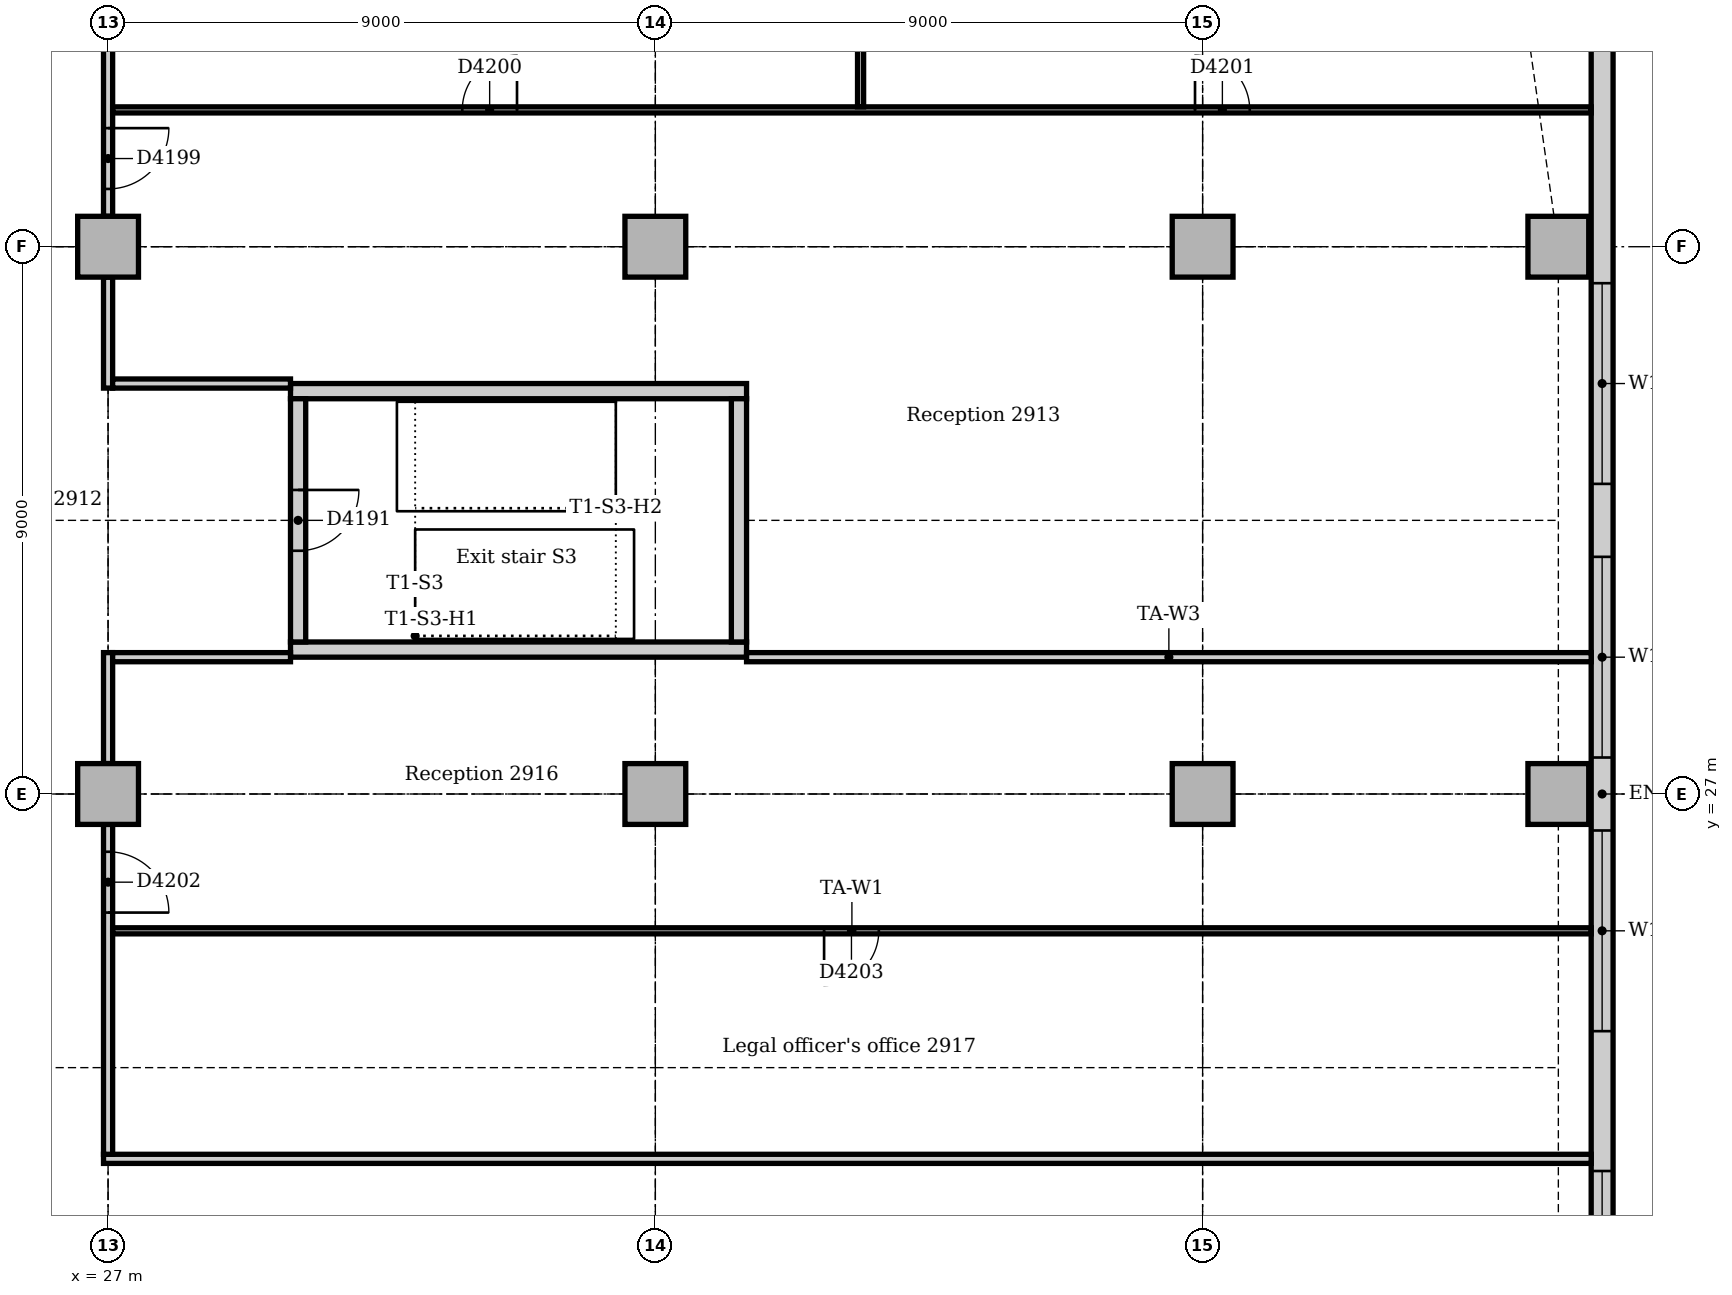
"""IFC4 building model, lengths in metres.
Left out: names, types, materials, properties, quantities, classifications, styles, units other than length and angle.
Written with IfcOpenShell. Run it as: python <this file> out.ifc"""

import sys

from ifc_helpers import new_model, si_unit, direction, frame, frame_2d, origin, origin_2d, place, context, subcontext, project, spatial, rectangle, extrude, element, fill, save


model = new_model("IFC4")
c1 = context("Model", 3, precision=1e-05, world=origin(), true_north=direction((0.0, 1.0)))
c2 = subcontext(c1, "Body", "Model", "MODEL_VIEW")
j1 = project(units=[si_unit("LENGTHUNIT", "METRE"), si_unit("PLANEANGLEUNIT", "RADIAN")], contexts=[c1])
p1 = place(None, origin())
s1 = spatial("IfcSite", under=j1, at=p1, CompositionType="ELEMENT")
p2 = place(p1, origin())
s2 = spatial("IfcBuilding", under=s1, at=p2, CompositionType="ELEMENT")
p3 = place(p2, frame((0.0, 0.0, 124.0)))
s3 = spatial("IfcBuildingStorey", under=s2, at=p3, CompositionType="ELEMENT", Elevation=124.0)
for number, where, z_axis, x_axis in (
    (1, (30.0, 29.375, 0.0), (0.0, 0.0, 1.0), (1.0, 0.0, 0.0)),
    (2, (37.5, 33.625, 0.0), (0.0, 0.0, 1.0), (-1.0, 0.0, 0.0)),
):
    element("IfcWall", number, at=place(p3, frame(where, z_axis=z_axis, x_axis=x_axis)), inside=s3, PredefinedType="SOLIDWALL", context=c2, shape_type="SweptSolid", body=[
        extrude(rectangle(XDim=7.5, YDim=0.25, at=frame_2d((3.75, 0.0))), origin(), (0.0, 0.0, 1.0), 4.0),
    ])
p4 = place(p3, frame((37.375, 29.5, 0.0), z_axis=(0.0, 0.0, 1.0), x_axis=(0.0, 1.0, 0.0)))
e3 = element("IfcWall", 3, at=p4, inside=s3, PredefinedType="SOLIDWALL", context=c2, shape_type="SweptSolid", body=[
    extrude(rectangle(XDim=4.0, YDim=0.25, at=frame_2d((2.0, 0.0))), origin(), (0.0, 0.0, 1.0), 4.0),
])
p5 = place(p3, frame((30.125, 33.5, 0.0), z_axis=(0.0, 0.0, 1.0), x_axis=(0.0, -1.0, 0.0)))
e4 = element("IfcWall", 4, at=p5, inside=s3, PredefinedType="SOLIDWALL", context=c2, shape_type="SweptSolid", body=[
    extrude(rectangle(XDim=4.0, YDim=0.25, at=frame_2d((2.0, 0.0))), origin(), (0.0, 0.0, 1.0), 4.0),
])
p6 = place(p5, frame((1.5, 0.0, 0.0)))
e5 = element("IfcOpeningElement", 5, at=p6, cuts=e4, PredefinedType="OPENING", context=c2, shape_type="SweptSolid", body=[
    extrude(rectangle(XDim=1.0, YDim=2.1, at=frame_2d((0.5, 1.05))), frame((0.0, 0.135, 0.0), z_axis=(0.0, -1.0, 0.0), x_axis=(1.0, 0.0, 0.0)), (0.0, 0.0, 1.0), 0.27),
])
for number, where, z_axis, x_axis in (
    (6, (50.85, 27.0, 0.0), (0.0, 0.0, 1.0), (1.0, 0.0, 0.0)),
    (7, (50.85, 36.0, 0.0), (0.0, 0.0, 1.0), (1.0, 0.0, 0.0)),
    (8, (27.0, 27.0, 0.0), (0.0, 0.0, 1.0), (1.0, 0.0, 0.0)),
    (9, (27.0, 36.0, 0.0), (0.0, 0.0, 1.0), (1.0, 0.0, 0.0)),
    (10, (36.0, 27.0, 0.0), (0.0, 0.0, 1.0), (1.0, 0.0, 0.0)),
    (11, (36.0, 36.0, 0.0), (0.0, 0.0, 1.0), (1.0, 0.0, 0.0)),
    (12, (45.0, 27.0, 0.0), (0.0, 0.0, 1.0), (1.0, 0.0, 0.0)),
    (13, (45.0, 36.0, 0.0), (0.0, 0.0, 1.0), (1.0, 0.0, 0.0)),
):
    element("IfcColumn", number, at=place(p3, frame(where, z_axis=z_axis, x_axis=x_axis)), inside=s3, PredefinedType="COLUMN", context=c2, shape_type="SweptSolid", body=[
        extrude(rectangle(XDim=1.0, YDim=1.0, at=origin_2d()), origin(), (0.0, 0.0, 1.0), 3.85),
    ])
p7 = place(p3, frame((51.57, 14.743, 0.0), z_axis=(0.0, 0.0, 1.0), x_axis=(0.0, 1.0, 0.0)))
e14 = element("IfcWall", 14, at=p7, inside=s3, PredefinedType="STANDARD", context=c2, shape_type="SweptSolid", body=[
    extrude(rectangle(XDim=24.515, YDim=0.36, at=frame_2d((12.257, 0.0))), origin(), (0.0, 0.0, 1.0), 3.85),
])
p8 = place(p7, frame((4.257, 0.0, 0.9)))
e15 = element("IfcOpeningElement", 15, at=p8, cuts=e14, PredefinedType="OPENING", context=c2, shape_type="SweptSolid", body=[
    extrude(rectangle(XDim=1.8, YDim=1.6, at=frame_2d((0.9, 0.8))), frame((0.0, 0.19, 0.0), z_axis=(0.0, -1.0, 0.0), x_axis=(1.0, 0.0, 0.0)), (0.0, 0.0, 1.0), 0.38),
])
p9 = place(p7, frame((8.357, 0.0, 0.9)))
e16 = element("IfcOpeningElement", 16, at=p9, cuts=e14, PredefinedType="OPENING", context=c2, shape_type="SweptSolid", body=[
    extrude(rectangle(XDim=3.3, YDim=1.6, at=frame_2d((1.65, 0.8))), frame((0.0, 0.19, 0.0), z_axis=(0.0, -1.0, 0.0), x_axis=(1.0, 0.0, 0.0)), (0.0, 0.0, 1.0), 0.38),
])
p10 = place(p7, frame((12.857, 0.0, 0.9)))
e17 = element("IfcOpeningElement", 17, at=p10, cuts=e14, PredefinedType="OPENING", context=c2, shape_type="SweptSolid", body=[
    extrude(rectangle(XDim=3.3, YDim=1.6, at=frame_2d((1.65, 0.8))), frame((0.0, 0.19, 0.0), z_axis=(0.0, -1.0, 0.0), x_axis=(1.0, 0.0, 0.0)), (0.0, 0.0, 1.0), 0.38),
])
p11 = place(p7, frame((17.357, 0.0, 0.9)))
e18 = element("IfcOpeningElement", 18, at=p11, cuts=e14, PredefinedType="OPENING", context=c2, shape_type="SweptSolid", body=[
    extrude(rectangle(XDim=3.3, YDim=1.6, at=frame_2d((1.65, 0.8))), frame((0.0, 0.19, 0.0), z_axis=(0.0, -1.0, 0.0), x_axis=(1.0, 0.0, 0.0)), (0.0, 0.0, 1.0), 0.38),
])
p12 = place(p3, frame((26.925, 21.0, 0.0), z_axis=(0.0, 0.0, 1.0), x_axis=(1.0, 0.0, 0.0)))
e19 = element("IfcWall", 19, at=p12, inside=s3, PredefinedType="PARTITIONING", context=c2, shape_type="SweptSolid", body=[
    extrude(rectangle(XDim=24.465, YDim=0.15, at=frame_2d((12.232, 0.0))), origin(), (0.0, 0.0, 1.0), 3.85),
])
p13 = place(p3, frame((27.0, 33.675, 0.0), z_axis=(0.0, 0.0, 1.0), x_axis=(0.0, 1.0, 0.0)))
e20 = element("IfcWall", 20, at=p13, inside=s3, PredefinedType="PARTITIONING", context=c2, shape_type="SweptSolid", body=[
    extrude(rectangle(XDim=1.825, YDim=0.15, at=frame_2d((0.912, 0.0))), origin(), (0.0, 0.0, 1.0), 3.256),
])
p14 = place(p3, frame((27.0, 36.5, 0.0), z_axis=(0.0, 0.0, 1.0), x_axis=(0.0, 1.0, 0.0)))
e21 = element("IfcWall", 21, at=p14, inside=s3, PredefinedType="PARTITIONING", context=c2, shape_type="SweptSolid", body=[
    extrude(rectangle(XDim=7.1, YDim=0.15, at=frame_2d((3.55, 0.0))), origin(), (0.0, 0.0, 1.0), 3.256),
])
p15 = place(p14, frame((0.45, 0.0, 0.0)))
e22 = element("IfcOpeningElement", 22, at=p15, cuts=e21, PredefinedType="OPENING", context=c2, shape_type="SweptSolid", body=[
    extrude(rectangle(XDim=1.0, YDim=2.1, at=frame_2d((0.5, 1.05))), frame((0.0, 0.085, 0.0), z_axis=(0.0, -1.0, 0.0), x_axis=(1.0, 0.0, 0.0)), (0.0, 0.0, 1.0), 0.17),
])
p16 = place(p3, frame((27.0, 21.075, 0.0), z_axis=(0.0, 0.0, 1.0), x_axis=(0.0, 1.0, 0.0)))
e23 = element("IfcWall", 23, at=p16, inside=s3, PredefinedType="PARTITIONING", context=c2, shape_type="SweptSolid", body=[
    extrude(rectangle(XDim=5.425, YDim=0.15, at=frame_2d((2.712, 0.0))), origin(), (0.0, 0.0, 1.0), 3.256),
])
p17 = place(p16, frame((3.975, 0.0, 0.0)))
e24 = element("IfcOpeningElement", 24, at=p17, cuts=e23, PredefinedType="OPENING", context=c2, shape_type="SweptSolid", body=[
    extrude(rectangle(XDim=1.0, YDim=2.1, at=frame_2d((0.5, 1.05))), frame((0.0, 0.085, 0.0), z_axis=(0.0, -1.0, 0.0), x_axis=(1.0, 0.0, 0.0)), (0.0, 0.0, 1.0), 0.17),
])
p18 = place(p3, frame((27.0, 27.5, 0.0), z_axis=(0.0, 0.0, 1.0), x_axis=(0.0, 1.0, 0.0)))
e25 = element("IfcWall", 25, at=p18, inside=s3, PredefinedType="PARTITIONING", context=c2, shape_type="SweptSolid", body=[
    extrude(rectangle(XDim=1.825, YDim=0.15, at=frame_2d((0.912, 0.0))), origin(), (0.0, 0.0, 1.0), 3.256),
])
for number, where, z_axis, x_axis in (
    (26, (27.075, 29.25, 0.0), (0.0, 0.0, 1.0), (1.0, 0.0, 0.0)),
    (27, (27.075, 33.75, 0.0), (0.0, 0.0, 1.0), (1.0, 0.0, 0.0)),
):
    element("IfcWall", number, at=place(p3, frame(where, z_axis=z_axis, x_axis=x_axis)), inside=s3, PredefinedType="PARTITIONING", context=c2, shape_type="SweptSolid", body=[
        extrude(rectangle(XDim=2.925, YDim=0.15, at=frame_2d((1.462, 0.0))), origin(), (0.0, 0.0, 1.0), 3.85),
    ])
p19 = place(p3, frame((37.5, 29.25, 0.0), z_axis=(0.0, 0.0, 1.0), x_axis=(1.0, 0.0, 0.0)))
e28 = element("IfcWall", 28, at=p19, inside=s3, PredefinedType="PARTITIONING", context=c2, shape_type="SweptSolid", body=[
    extrude(rectangle(XDim=13.89, YDim=0.15, at=frame_2d((6.945, 0.0))), origin(), (0.0, 0.0, 1.0), 3.85),
])
p20 = place(p3, frame((27.075, 24.75, 0.0), z_axis=(0.0, 0.0, 1.0), x_axis=(1.0, 0.0, 0.0)))
e29 = element("IfcWall", 29, at=p20, inside=s3, PredefinedType="PARTITIONING", context=c2, shape_type="SweptSolid", body=[
    extrude(rectangle(XDim=24.315, YDim=0.1, at=frame_2d((12.158, 0.0))), origin(), (0.0, 0.0, 1.0), 3.85),
])
p21 = place(p20, frame((11.7, 0.0, 0.0)))
e30 = element("IfcOpeningElement", 30, at=p21, cuts=e29, PredefinedType="OPENING", context=c2, shape_type="SweptSolid", body=[
    extrude(rectangle(XDim=0.9, YDim=2.1, at=frame_2d((0.45, 1.05))), frame((0.0, 0.06, 0.0), z_axis=(0.0, -1.0, 0.0), x_axis=(1.0, 0.0, 0.0)), (0.0, 0.0, 1.0), 0.12),
])
p22 = place(p3, frame((27.075, 38.25, 0.0), z_axis=(0.0, 0.0, 1.0), x_axis=(1.0, 0.0, 0.0)))
e31 = element("IfcWall", 31, at=p22, inside=s3, PredefinedType="PARTITIONING", context=c2, shape_type="SweptSolid", body=[
    extrude(rectangle(XDim=24.315, YDim=0.1, at=frame_2d((12.158, 0.0))), origin(), (0.0, 0.0, 1.0), 3.85),
])
p23 = place(p22, frame((5.75, 0.0, 0.0)))
e32 = element("IfcOpeningElement", 32, at=p23, cuts=e31, PredefinedType="OPENING", context=c2, shape_type="SweptSolid", body=[
    extrude(rectangle(XDim=0.9, YDim=2.1, at=frame_2d((0.45, 1.05))), frame((0.0, 0.06, 0.0), z_axis=(0.0, -1.0, 0.0), x_axis=(1.0, 0.0, 0.0)), (0.0, 0.0, 1.0), 0.12),
])
p24 = place(p22, frame((17.8, 0.0, 0.0)))
e33 = element("IfcOpeningElement", 33, at=p24, cuts=e31, PredefinedType="OPENING", context=c2, shape_type="SweptSolid", body=[
    extrude(rectangle(XDim=0.9, YDim=2.1, at=frame_2d((0.45, 1.05))), frame((0.0, 0.06, 0.0), z_axis=(0.0, -1.0, 0.0), x_axis=(1.0, 0.0, 0.0)), (0.0, 0.0, 1.0), 0.12),
])
p25 = place(p3, frame((39.375, 38.3, 0.0), z_axis=(0.0, 0.0, 1.0), x_axis=(0.0, 1.0, 0.0)))
e34 = element("IfcWall", 34, at=p25, inside=s3, PredefinedType="PARTITIONING", context=c2, shape_type="SweptSolid", body=[
    extrude(rectangle(XDim=10.84, YDim=0.1, at=frame_2d((5.42, 0.0))), origin(), (0.0, 0.0, 1.0), 3.85),
])
p26 = place(p8, origin())
e35 = element("IfcWindow", 35, at=p26, inside=s3, PartitioningType="SINGLE_PANEL", PredefinedType="WINDOW", context=c2, shape_type="SweptSolid", body=[
    extrude(rectangle(XDim=1.8, YDim=1.6, at=frame_2d((0.9, 0.8))), frame((0.0, 0.13, 0.0), z_axis=(0.0, -1.0, 0.0), x_axis=(1.0, 0.0, 0.0)), (0.0, 0.0, 1.0), 0.06),
])
fill(e15, e35)
p27 = place(p9, origin())
e36 = element("IfcWindow", 36, at=p27, inside=s3, PartitioningType="SINGLE_PANEL", PredefinedType="WINDOW", context=c2, shape_type="SweptSolid", body=[
    extrude(rectangle(XDim=3.3, YDim=1.6, at=frame_2d((1.65, 0.8))), frame((0.0, 0.13, 0.0), z_axis=(0.0, -1.0, 0.0), x_axis=(1.0, 0.0, 0.0)), (0.0, 0.0, 1.0), 0.06),
])
fill(e16, e36)
p28 = place(p10, origin())
e37 = element("IfcWindow", 37, at=p28, inside=s3, PartitioningType="SINGLE_PANEL", PredefinedType="WINDOW", context=c2, shape_type="SweptSolid", body=[
    extrude(rectangle(XDim=3.3, YDim=1.6, at=frame_2d((1.65, 0.8))), frame((0.0, 0.13, 0.0), z_axis=(0.0, -1.0, 0.0), x_axis=(1.0, 0.0, 0.0)), (0.0, 0.0, 1.0), 0.06),
])
fill(e17, e37)
p29 = place(p11, origin())
e38 = element("IfcWindow", 38, at=p29, inside=s3, PartitioningType="SINGLE_PANEL", PredefinedType="WINDOW", context=c2, shape_type="SweptSolid", body=[
    extrude(rectangle(XDim=3.3, YDim=1.6, at=frame_2d((1.65, 0.8))), frame((0.0, 0.13, 0.0), z_axis=(0.0, -1.0, 0.0), x_axis=(1.0, 0.0, 0.0)), (0.0, 0.0, 1.0), 0.06),
])
fill(e18, e38)
p30 = place(p6, origin())
e39 = element("IfcDoor", 39, at=p30, inside=s3, OperationType="SINGLE_SWING_LEFT", PredefinedType="DOOR", context=c2, shape_type="SweptSolid", body=[
    extrude(rectangle(XDim=1.0, YDim=2.1, at=frame_2d((0.5, 1.05))), frame((0.0, 0.025, 0.0), z_axis=(0.0, -1.0, 0.0), x_axis=(1.0, 0.0, 0.0)), (0.0, 0.0, 1.0), 0.05),
])
fill(e5, e39)
p31 = place(p15, frame((1.0, 0.0, 0.0), z_axis=(0.0, 0.0, 1.0), x_axis=(-1.0, 0.0, 0.0)))
e40 = element("IfcDoor", 40, at=p31, inside=s3, OperationType="SINGLE_SWING_LEFT", PredefinedType="DOOR", context=c2, shape_type="SweptSolid", body=[
    extrude(rectangle(XDim=1.0, YDim=2.1, at=frame_2d((0.5, 1.05))), frame((0.0, 0.025, 0.0), z_axis=(0.0, -1.0, 0.0), x_axis=(1.0, 0.0, 0.0)), (0.0, 0.0, 1.0), 0.05),
])
fill(e22, e40)
p32 = place(p23, origin())
e41 = element("IfcDoor", 41, at=p32, inside=s3, OperationType="SINGLE_SWING_RIGHT", PredefinedType="DOOR", context=c2, shape_type="SweptSolid", body=[
    extrude(rectangle(XDim=0.9, YDim=2.1, at=frame_2d((0.45, 1.05))), frame((0.0, 0.025, 0.0), z_axis=(0.0, -1.0, 0.0), x_axis=(1.0, 0.0, 0.0)), (0.0, 0.0, 1.0), 0.05),
])
fill(e32, e41)
p33 = place(p24, origin())
e42 = element("IfcDoor", 42, at=p33, inside=s3, OperationType="SINGLE_SWING_LEFT", PredefinedType="DOOR", context=c2, shape_type="SweptSolid", body=[
    extrude(rectangle(XDim=0.9, YDim=2.1, at=frame_2d((0.45, 1.05))), frame((0.0, 0.025, 0.0), z_axis=(0.0, -1.0, 0.0), x_axis=(1.0, 0.0, 0.0)), (0.0, 0.0, 1.0), 0.05),
])
fill(e33, e42)
p34 = place(p17, frame((1.0, 0.0, 0.0), z_axis=(0.0, 0.0, 1.0), x_axis=(-1.0, 0.0, 0.0)))
e43 = element("IfcDoor", 43, at=p34, inside=s3, OperationType="SINGLE_SWING_RIGHT", PredefinedType="DOOR", context=c2, shape_type="SweptSolid", body=[
    extrude(rectangle(XDim=1.0, YDim=2.1, at=frame_2d((0.5, 1.05))), frame((0.0, 0.025, 0.0), z_axis=(0.0, -1.0, 0.0), x_axis=(1.0, 0.0, 0.0)), (0.0, 0.0, 1.0), 0.05),
])
fill(e24, e43)
p35 = place(p21, frame((0.9, 0.0, 0.0), z_axis=(0.0, 0.0, 1.0), x_axis=(-1.0, 0.0, 0.0)))
e44 = element("IfcDoor", 44, at=p35, inside=s3, OperationType="SINGLE_SWING_RIGHT", PredefinedType="DOOR", context=c2, shape_type="SweptSolid", body=[
    extrude(rectangle(XDim=0.9, YDim=2.1, at=frame_2d((0.45, 1.05))), frame((0.0, 0.025, 0.0), z_axis=(0.0, -1.0, 0.0), x_axis=(1.0, 0.0, 0.0)), (0.0, 0.0, 1.0), 0.05),
])
fill(e30, e44)
save(model, sys.argv[1])
